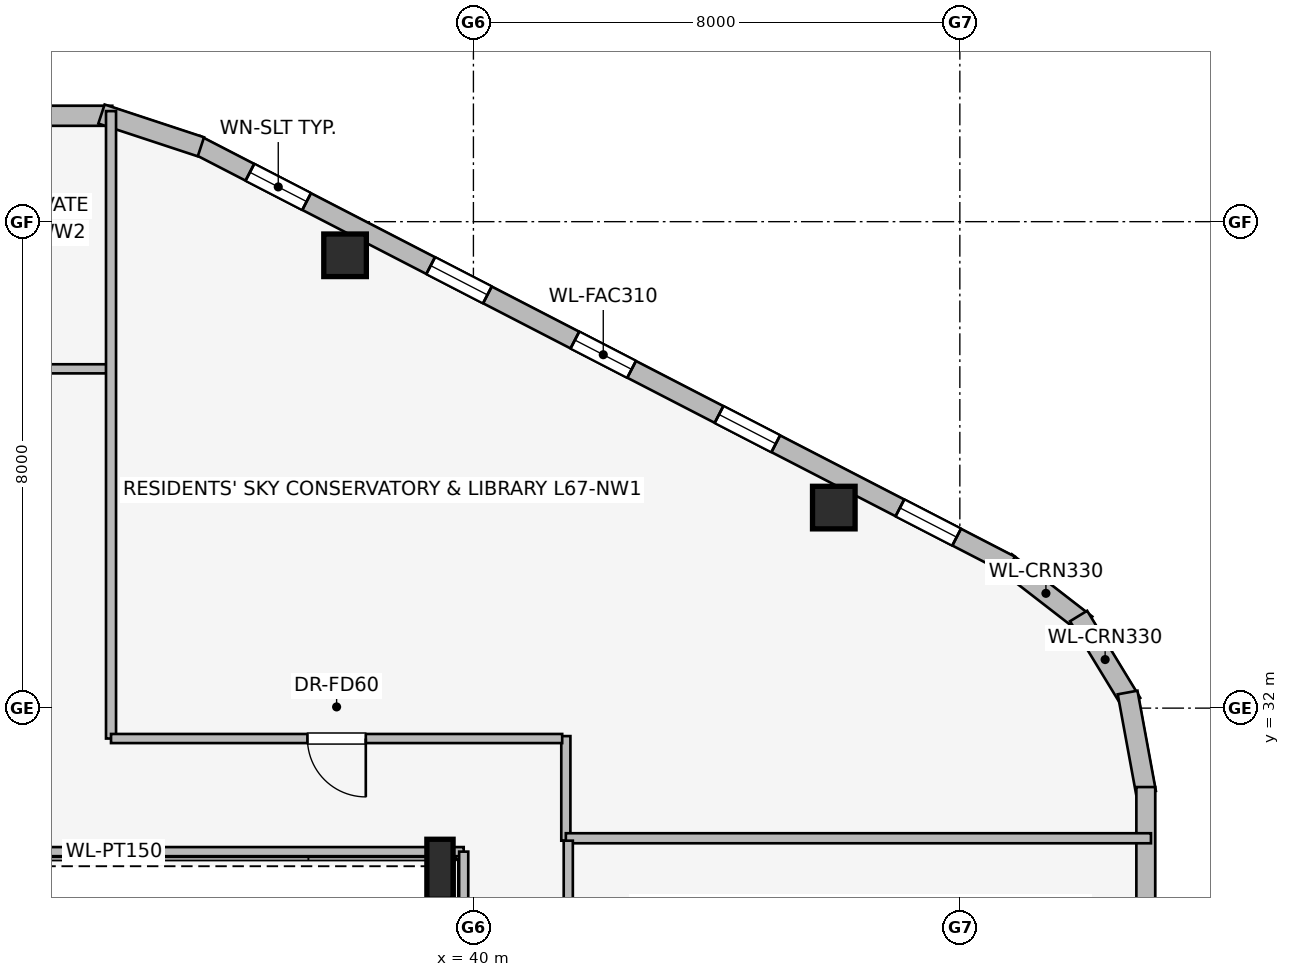
"""IFC4 building model, lengths in metres.
Left out: names, types, materials, properties, quantities, classifications, styles, units other than length and angle.
Written with IfcOpenShell. Run it as: python <this file> out.ifc"""

import sys

from ifc_helpers import new_model, si_unit, direction, frame, frame_2d, origin, origin_2d, place, context, subcontext, project, spatial, rectangle, i_section, extrude, element, fill, save


model = new_model("IFC4")
c1 = context("Model", 3, precision=1e-05, world=origin(), true_north=direction((0.0, 1.0)))
c2 = subcontext(c1, "Body", "Model", "MODEL_VIEW")
j1 = project(units=[si_unit("LENGTHUNIT", "METRE"), si_unit("PLANEANGLEUNIT", "RADIAN")], contexts=[c1])
p1 = place(None, origin())
s1 = spatial("IfcSite", under=j1, at=p1, CompositionType="ELEMENT")
p2 = place(p1, origin())
s2 = spatial("IfcBuilding", under=s1, at=p2, CompositionType="ELEMENT")
p3 = place(p2, frame((0.0, 0.0, 245.45)))
s3 = spatial("IfcBuildingStorey", under=s2, at=p3, CompositionType="ELEMENT", Elevation=245.45)
for number, where, z_axis, x_axis in (
    (1, (45.927, 35.298, 0.0), (0.0, 0.0, 1.0), (1.0, 0.0, 0.0)),
    (2, (37.889, 39.447, 0.0), (0.0, 0.0, 1.0), (1.0, 0.0, 0.0)),
):
    element("IfcColumn", number, at=place(p3, frame(where, z_axis=z_axis, x_axis=x_axis)), inside=s3, PredefinedType="COLUMN", context=c2, shape_type="SweptSolid", body=[
        extrude(rectangle(XDim=0.7, YDim=0.7, at=origin_2d()), origin(), (0.0, 0.0, 1.0), 3.55),
    ])
p4 = place(p3, frame((39.45, 29.35, 0.0), z_axis=(0.0, 0.0, 1.0), x_axis=(1.0, 0.0, 0.0)))
e3 = element("IfcColumn", 3, at=p4, inside=s3, PredefinedType="COLUMN", context=c2, shape_type="SweptSolid", body=[
    extrude(i_section(OverallWidth=0.431, OverallDepth=0.987, WebThickness=0.034, FlangeThickness=0.062, at=origin_2d()), origin(), (0.0, 0.0, 1.0), 3.55),
])
p5 = place(p3, frame((48.753, 34.401, 0.0), z_axis=(0.0, 0.0, 1.0), x_axis=(0.790691856293, -0.61221433207, 0.0)))
e4 = element("IfcWall", 4, at=p5, inside=s3, PredefinedType="STANDARD", context=c2, shape_type="SweptSolid", body=[
    extrude(rectangle(XDim=1.676, YDim=0.33, at=frame_2d((0.838, 0.0))), origin(), (0.0, 0.0, 1.0), 3.29),
])
p6 = place(p3, frame((49.953, 33.515, 0.0), z_axis=(0.0, 0.0, 1.0), x_axis=(0.520325409202, -0.853968072318, 0.0)))
e5 = element("IfcWall", 5, at=p6, inside=s3, PredefinedType="STANDARD", context=c2, shape_type="SweptSolid", body=[
    extrude(rectangle(XDim=1.678, YDim=0.33, at=frame_2d((0.839, 0.0))), origin(), (0.0, 0.0, 1.0), 3.29),
])
p7 = place(p3, frame((50.759, 32.257, 0.0), z_axis=(0.0, 0.0, 1.0), x_axis=(0.180691763044, -0.983539773862, 0.0)))
e6 = element("IfcWall", 6, at=p7, inside=s3, PredefinedType="STANDARD", context=c2, shape_type="SweptSolid", body=[
    extrude(rectangle(XDim=1.677, YDim=0.33, at=frame_2d((0.838, 0.0))), origin(), (0.0, 0.0, 1.0), 3.29),
])
p8 = place(p3, frame((35.437, 41.27, 0.0), z_axis=(0.0, 0.0, 1.0), x_axis=(0.888581481622, -0.458718814218, 0.0)))
e7 = element("IfcWall", 7, at=p8, inside=s3, PredefinedType="STANDARD", context=c2, shape_type="SweptSolid", body=[
    extrude(rectangle(XDim=15.077, YDim=0.31, at=frame_2d((7.539, 0.0))), origin(), (0.0, 0.0, 1.0), 3.29),
])
p9 = place(p8, frame((0.998, 0.0, 0.75)))
e8 = element("IfcOpeningElement", 8, at=p9, cuts=e7, PredefinedType="OPENING", context=c2, shape_type="SweptSolid", body=[
    extrude(rectangle(XDim=1.05, YDim=1.4, at=frame_2d((0.525, 0.7))), frame((0.0, 0.165, 0.0), z_axis=(0.0, -1.0, 0.0), x_axis=(1.0, 0.0, 0.0)), (0.0, 0.0, 1.0), 0.33),
])
p10 = place(p8, frame((4.344, 0.0, 0.75)))
e9 = element("IfcOpeningElement", 9, at=p10, cuts=e7, PredefinedType="OPENING", context=c2, shape_type="SweptSolid", body=[
    extrude(rectangle(XDim=1.05, YDim=1.4, at=frame_2d((0.525, 0.7))), frame((0.0, 0.165, 0.0), z_axis=(0.0, -1.0, 0.0), x_axis=(1.0, 0.0, 0.0)), (0.0, 0.0, 1.0), 0.33),
])
p11 = place(p8, frame((7.013, 0.0, 0.75)))
e10 = element("IfcOpeningElement", 10, at=p11, cuts=e7, PredefinedType="OPENING", context=c2, shape_type="SweptSolid", body=[
    extrude(rectangle(XDim=1.05, YDim=1.4, at=frame_2d((0.525, 0.7))), frame((0.0, 0.165, 0.0), z_axis=(0.0, -1.0, 0.0), x_axis=(1.0, 0.0, 0.0)), (0.0, 0.0, 1.0), 0.33),
])
p12 = place(p8, frame((9.681, 0.0, 0.75)))
e11 = element("IfcOpeningElement", 11, at=p12, cuts=e7, PredefinedType="OPENING", context=c2, shape_type="SweptSolid", body=[
    extrude(rectangle(XDim=1.05, YDim=1.4, at=frame_2d((0.525, 0.7))), frame((0.0, 0.165, 0.0), z_axis=(0.0, -1.0, 0.0), x_axis=(1.0, 0.0, 0.0)), (0.0, 0.0, 1.0), 0.33),
])
p13 = place(p8, frame((13.029, 0.0, 0.75)))
e12 = element("IfcOpeningElement", 12, at=p13, cuts=e7, PredefinedType="OPENING", context=c2, shape_type="SweptSolid", body=[
    extrude(rectangle(XDim=1.05, YDim=1.4, at=frame_2d((0.525, 0.7))), frame((0.0, 0.165, 0.0), z_axis=(0.0, -1.0, 0.0), x_axis=(1.0, 0.0, 0.0)), (0.0, 0.0, 1.0), 0.33),
])
p14 = place(p3, frame((32.339, 41.741, 0.0), z_axis=(0.0, 0.0, 1.0), x_axis=(1.0, 0.0, 0.0)))
e13 = element("IfcWall", 13, at=p14, inside=s3, PredefinedType="STANDARD", context=c2, shape_type="SweptSolid", body=[
    extrude(rectangle(XDim=1.722, YDim=0.33, at=frame_2d((0.861, 0.0))), origin(), (0.0, 0.0, 1.0), 3.29),
])
p15 = place(p3, frame((33.883, 41.77, 0.0), z_axis=(0.0, 0.0, 1.0), x_axis=(0.949713440491, -0.313120393699, 0.0)))
e14 = element("IfcWall", 14, at=p15, inside=s3, PredefinedType="STANDARD", context=c2, shape_type="SweptSolid", body=[
    extrude(rectangle(XDim=1.722, YDim=0.33, at=frame_2d((0.861, 0.0))), origin(), (0.0, 0.0, 1.0), 3.29),
])
p16 = place(p3, frame((51.058, 30.702, 0.0), z_axis=(0.0, 0.0, 1.0), x_axis=(0.0, -1.0, 0.0)))
e15 = element("IfcWall", 15, at=p16, inside=s3, PredefinedType="STANDARD", context=c2, shape_type="SweptSolid", body=[
    extrude(rectangle(XDim=13.404, YDim=0.31, at=frame_2d((6.702, 0.0))), origin(), (0.0, 0.0, 1.0), 3.29),
])
p17 = place(p16, frame((5.386, 0.0, 0.75)))
e16 = element("IfcOpeningElement", 16, at=p17, cuts=e15, PredefinedType="OPENING", context=c2, shape_type="SweptSolid", body=[
    extrude(rectangle(XDim=2.4, YDim=1.6, at=frame_2d((1.2, 0.8))), frame((0.0, 0.165, 0.0), z_axis=(0.0, -1.0, 0.0), x_axis=(1.0, 0.0, 0.0)), (0.0, 0.0, 1.0), 0.33),
])
p18 = place(p16, frame((9.04, 0.0, 0.75)))
e17 = element("IfcOpeningElement", 17, at=p18, cuts=e15, PredefinedType="OPENING", context=c2, shape_type="SweptSolid", body=[
    extrude(rectangle(XDim=1.05, YDim=1.4, at=frame_2d((0.525, 0.7))), frame((0.0, 0.165, 0.0), z_axis=(0.0, -1.0, 0.0), x_axis=(1.0, 0.0, 0.0)), (0.0, 0.0, 1.0), 0.33),
])
p19 = place(p3, frame((39.84, 29.64, 0.0), z_axis=(0.0, 0.0, 1.0), x_axis=(-1.0, 0.0, 0.0)))
e18 = element("IfcWall", 18, at=p19, inside=s3, PredefinedType="PARTITIONING", context=c2, shape_type="SweptSolid", body=[
    extrude(rectangle(XDim=12.203, YDim=0.15, at=frame_2d((6.102, 0.0))), origin(), (0.0, 0.0, 1.0), 2.431),
])
p20 = place(p3, frame((39.84, 18.36, 0.0), z_axis=(0.0, 0.0, 1.0), x_axis=(0.0, 1.0, 0.0)))
e19 = element("IfcWall", 19, at=p20, inside=s3, PredefinedType="PARTITIONING", context=c2, shape_type="SweptSolid", body=[
    extrude(rectangle(XDim=11.28, YDim=0.15, at=frame_2d((5.64, 0.0))), origin(), (0.0, 0.0, 1.0), 3.29),
])
p21 = place(p3, frame((33.962, 37.58, 0.0), z_axis=(0.0, 0.0, 1.0), x_axis=(-1.0, 0.0, 0.0)))
e20 = element("IfcWall", 20, at=p21, inside=s3, PredefinedType="PARTITIONING", context=c2, shape_type="SweptSolid", body=[
    extrude(rectangle(XDim=5.401, YDim=0.15, at=frame_2d((2.7, 0.0))), origin(), (0.0, 0.0, 1.0), 2.682),
])
p22 = place(p21, frame((2.445, 0.0, 0.0)))
e21 = element("IfcOpeningElement", 21, at=p22, cuts=e20, PredefinedType="OPENING", context=c2, shape_type="SweptSolid", body=[
    extrude(rectangle(XDim=0.96, YDim=2.0, at=frame_2d((0.48, 1.0))), frame((0.0, 0.085, 0.0), z_axis=(0.0, -1.0, 0.0), x_axis=(1.0, 0.0, 0.0)), (0.0, 0.0, 1.0), 0.17),
])
p23 = place(p3, frame((34.04, 31.5, 0.0), z_axis=(0.0, 0.0, 1.0), x_axis=(0.0, 1.0, 0.0)))
e22 = element("IfcWall", 22, at=p23, inside=s3, PredefinedType="PARTITIONING", context=c2, shape_type="SweptSolid", body=[
    extrude(rectangle(XDim=10.318, YDim=0.165, at=frame_2d((5.159, 0.0))), origin(), (0.0, 0.0, 1.0), 3.29),
])
p24 = place(p3, frame((41.52, 29.82, 0.0), z_axis=(0.0, 0.0, 1.0), x_axis=(0.0, 1.0, 0.0)))
e23 = element("IfcWall", 23, at=p24, inside=s3, PredefinedType="PARTITIONING", context=c2, shape_type="SweptSolid", body=[
    extrude(rectangle(XDim=1.72, YDim=0.15, at=frame_2d((0.86, 0.0))), origin(), (0.0, 0.0, 1.0), 3.29),
])
p25 = place(p3, frame((41.46, 31.5, 0.0), z_axis=(0.0, 0.0, 1.0), x_axis=(-1.0, 0.0, 0.0)))
e24 = element("IfcWall", 24, at=p25, inside=s3, PredefinedType="PARTITIONING", context=c2, shape_type="SweptSolid", body=[
    extrude(rectangle(XDim=7.42, YDim=0.15, at=frame_2d((3.71, 0.0))), origin(), (0.0, 0.0, 1.0), 3.29),
])
p26 = place(p25, frame((3.23, 0.0, 0.0)))
e25 = element("IfcOpeningElement", 25, at=p26, cuts=e24, PredefinedType="OPENING", context=c2, shape_type="SweptSolid", body=[
    extrude(rectangle(XDim=0.96, YDim=2.0, at=frame_2d((0.48, 1.0))), frame((0.0, 0.085, 0.0), z_axis=(0.0, -1.0, 0.0), x_axis=(1.0, 0.0, 0.0)), (0.0, 0.0, 1.0), 0.17),
])
p27 = place(p3, frame((41.52, 29.86, 0.0), z_axis=(0.0, 0.0, 1.0), x_axis=(1.0, 0.0, 0.0)))
e26 = element("IfcWall", 26, at=p27, inside=s3, PredefinedType="PARTITIONING", context=c2, shape_type="SweptSolid", body=[
    extrude(rectangle(XDim=9.623, YDim=0.165, at=frame_2d((4.812, 0.0))), origin(), (0.0, 0.0, 1.0), 3.29),
])
p28 = place(p3, frame((41.56, 26.113, 0.0), z_axis=(0.0, 0.0, 1.0), x_axis=(0.0, 1.0, 0.0)))
e27 = element("IfcWall", 27, at=p28, inside=s3, PredefinedType="PARTITIONING", context=c2, shape_type="SweptSolid", body=[
    extrude(rectangle(XDim=3.707, YDim=0.15, at=frame_2d((1.854, 0.0))), origin(), (0.0, 0.0, 1.0), 3.29),
])
p29 = place(p28, frame((1.374, 0.0, 0.0)))
e28 = element("IfcOpeningElement", 28, at=p29, cuts=e27, PredefinedType="OPENING", context=c2, shape_type="SweptSolid", body=[
    extrude(rectangle(XDim=0.96, YDim=2.0, at=frame_2d((0.48, 1.0))), frame((0.0, 0.085, 0.0), z_axis=(0.0, -1.0, 0.0), x_axis=(1.0, 0.0, 0.0)), (0.0, 0.0, 1.0), 0.17),
])
p30 = place(p9, origin())
e29 = element("IfcWindow", 29, at=p30, inside=s3, PartitioningType="SINGLE_PANEL", PredefinedType="WINDOW", context=c2, shape_type="SweptSolid", body=[
    extrude(rectangle(XDim=1.05, YDim=1.4, at=frame_2d((0.525, 0.7))), frame((0.0, 0.03, 0.0), z_axis=(0.0, -1.0, 0.0), x_axis=(1.0, 0.0, 0.0)), (0.0, 0.0, 1.0), 0.06),
])
fill(e8, e29)
p31 = place(p10, origin())
e30 = element("IfcWindow", 30, at=p31, inside=s3, PartitioningType="SINGLE_PANEL", PredefinedType="WINDOW", context=c2, shape_type="SweptSolid", body=[
    extrude(rectangle(XDim=1.05, YDim=1.4, at=frame_2d((0.525, 0.7))), frame((0.0, 0.03, 0.0), z_axis=(0.0, -1.0, 0.0), x_axis=(1.0, 0.0, 0.0)), (0.0, 0.0, 1.0), 0.06),
])
fill(e9, e30)
p32 = place(p11, origin())
e31 = element("IfcWindow", 31, at=p32, inside=s3, PartitioningType="SINGLE_PANEL", PredefinedType="WINDOW", context=c2, shape_type="SweptSolid", body=[
    extrude(rectangle(XDim=1.05, YDim=1.4, at=frame_2d((0.525, 0.7))), frame((0.0, 0.03, 0.0), z_axis=(0.0, -1.0, 0.0), x_axis=(1.0, 0.0, 0.0)), (0.0, 0.0, 1.0), 0.06),
])
fill(e10, e31)
p33 = place(p12, origin())
e32 = element("IfcWindow", 32, at=p33, inside=s3, PartitioningType="SINGLE_PANEL", PredefinedType="WINDOW", context=c2, shape_type="SweptSolid", body=[
    extrude(rectangle(XDim=1.05, YDim=1.4, at=frame_2d((0.525, 0.7))), frame((0.0, 0.03, 0.0), z_axis=(0.0, -1.0, 0.0), x_axis=(1.0, 0.0, 0.0)), (0.0, 0.0, 1.0), 0.06),
])
fill(e11, e32)
p34 = place(p13, origin())
e33 = element("IfcWindow", 33, at=p34, inside=s3, PartitioningType="SINGLE_PANEL", PredefinedType="WINDOW", context=c2, shape_type="SweptSolid", body=[
    extrude(rectangle(XDim=1.05, YDim=1.4, at=frame_2d((0.525, 0.7))), frame((0.0, 0.03, 0.0), z_axis=(0.0, -1.0, 0.0), x_axis=(1.0, 0.0, 0.0)), (0.0, 0.0, 1.0), 0.06),
])
fill(e12, e33)
p35 = place(p26, origin())
e34 = element("IfcDoor", 34, at=p35, inside=s3, OperationType="SINGLE_SWING_LEFT", PredefinedType="DOOR", context=c2, shape_type="SweptSolid", body=[
    extrude(rectangle(XDim=0.96, YDim=2.0, at=frame_2d((0.48, 1.0))), frame((0.0, 0.025, 0.0), z_axis=(0.0, -1.0, 0.0), x_axis=(1.0, 0.0, 0.0)), (0.0, 0.0, 1.0), 0.05),
])
fill(e25, e34)
save(model, sys.argv[1])
